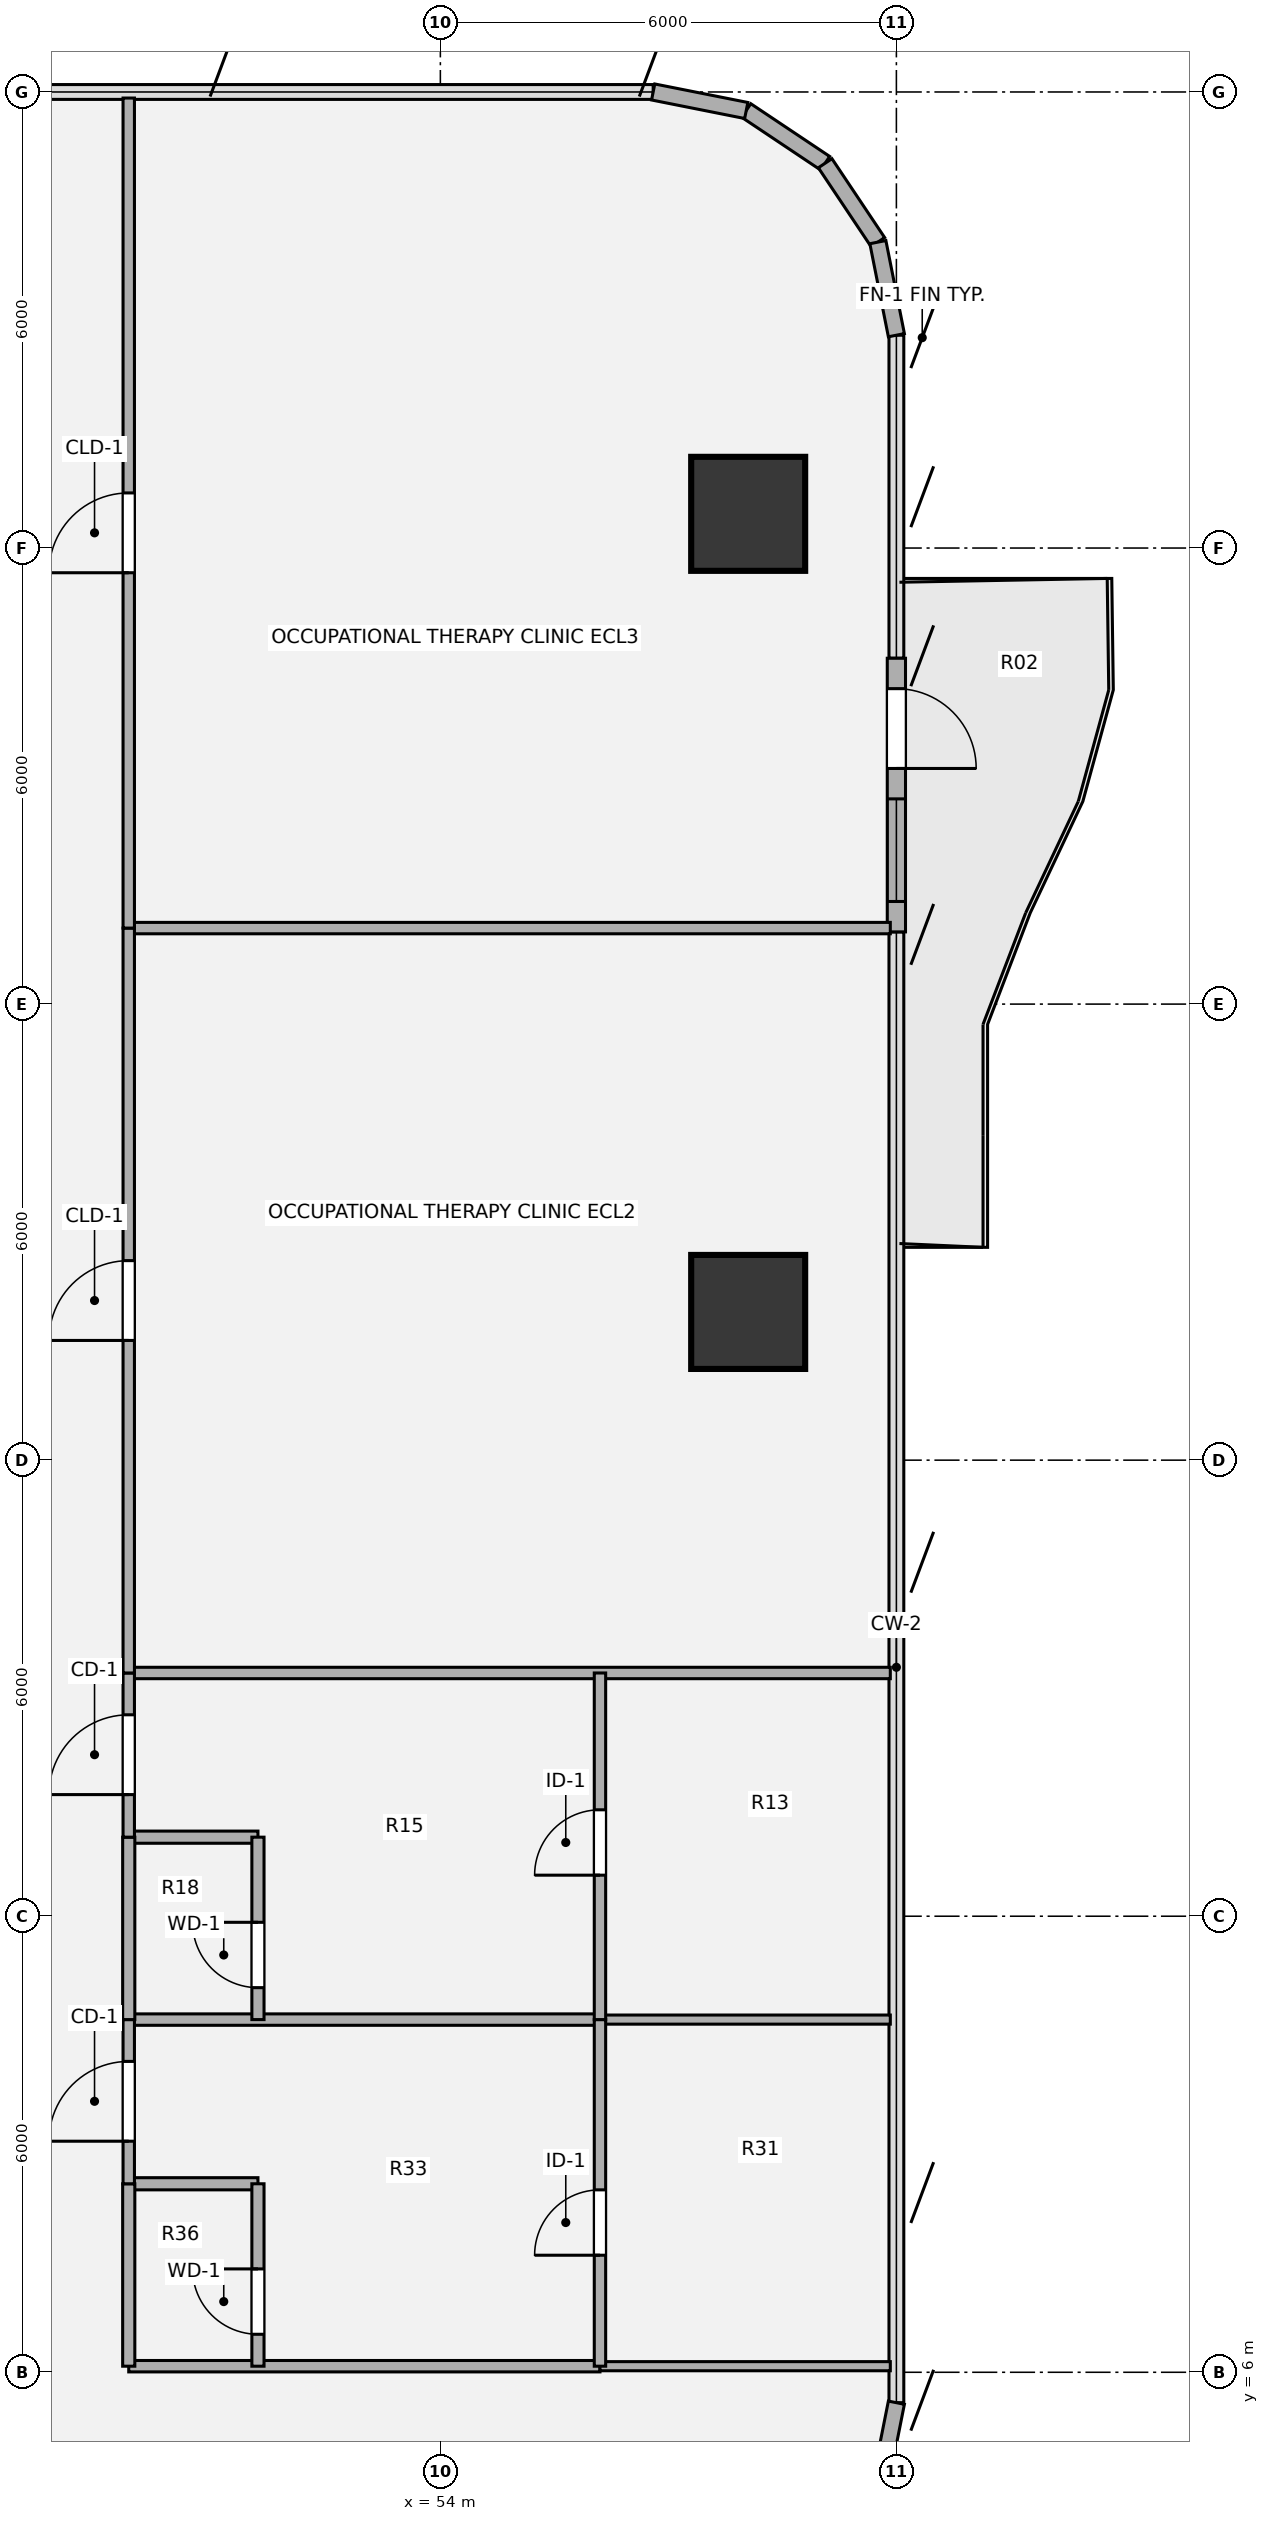
"""IFC4 building model, lengths in metres.
Left out: names, types, materials, properties, quantities, classifications, styles, units other than length and angle.
Written with IfcOpenShell. Run it as: python <this file> out.ifc"""

import sys

from ifc_helpers import new_model, si_unit, direction, frame, frame_2d, origin, origin_2d, place, context, subcontext, project, spatial, rectangle, hollow_circle, extrude, source, transform, mapped, element, fill, save


model = new_model("IFC4")
c1 = context("Model", 3, precision=1e-05, world=origin(), true_north=direction((0.0, 1.0)))
c2 = subcontext(c1, "Body", "Model", "MODEL_VIEW")
j1 = project(units=[si_unit("LENGTHUNIT", "METRE"), si_unit("PLANEANGLEUNIT", "RADIAN")], contexts=[c1])
p1 = place(None, origin())
s1 = spatial("IfcSite", under=j1, at=p1, CompositionType="ELEMENT")
p2 = place(p1, origin())
s2 = spatial("IfcBuilding", under=s1, at=p2, CompositionType="ELEMENT")
p3 = place(p2, frame((0.0, 0.0, 53.46)))
s3 = spatial("IfcBuildingStorey", under=s2, at=p3, CompositionType="ELEMENT", Elevation=53.46)
m1 = source(origin(), c2, "Body", "SweptSolid", [
    extrude(hollow_circle(Radius=0.75, WallThickness=0.05, at=origin_2d()), origin(), (0.0, 0.0, 1.0), 3.78),
])
for number, where, z_axis, x_axis in (
    (1, (58.05, 19.95, 0.0), (0.0, 0.0, 1.0), (1.0, 0.0, 0.0)),
    (2, (58.05, 30.45, 0.0), (0.0, 0.0, 1.0), (1.0, 0.0, 0.0)),
):
    element("IfcColumn", number, at=place(p3, frame(where, z_axis=z_axis, x_axis=x_axis)), inside=s3, PredefinedType="COLUMN", context=c2, shape_type="MappedRepresentation", body=[
        mapped(m1, transform((0.0, 0.0, 0.0), x_axis=(1.0, 0.0, 0.0), y_axis=(0.0, 1.0, 0.0), z_axis=(0.0, 0.0, 1.0), scale=1.0)),
    ])
for number, where, z_axis, x_axis in (
    (3, (58.025, 35.756, 0.0), (0.0, 0.0, 1.0), (0.831, -0.556, 0.0)),
    (4, (59.063, 35.063, 0.0), (0.0, 0.0, 1.0), (0.556, -0.831, 0.0)),
    (5, (59.756, 34.025, 0.0), (0.0, 0.0, 1.0), (0.195, -0.981, 0.0)),
):
    element("IfcWall", number, at=place(p3, frame(where, z_axis=z_axis, x_axis=x_axis)), inside=s3, PredefinedType="SOLIDWALL", context=c2, shape_type="SweptSolid", body=[
        extrude(rectangle(XDim=1.249, YDim=0.215, at=frame_2d((0.624, 0.0))), origin(), (0.0, 0.0, 1.0), 3.53),
    ])
p4 = place(p3, frame((60.0, 28.55, 0.0), z_axis=(0.0, 0.0, 1.0), x_axis=(0.0, -1.0, 0.0)))
e6 = element("IfcWall", 6, at=p4, inside=s3, PredefinedType="SOLIDWALL", context=c2, shape_type="SweptSolid", body=[
    extrude(rectangle(XDim=3.6, YDim=0.24, at=frame_2d((1.8, 0.0))), origin(), (0.0, 0.0, 1.0), 3.53),
])
p5 = place(p4, frame((0.4, 0.0, 0.0)))
e7 = element("IfcOpeningElement", 7, at=p5, cuts=e6, PredefinedType="OPENING", context=c2, shape_type="SweptSolid", body=[
    extrude(rectangle(XDim=1.05, YDim=2.15, at=origin_2d()), frame((0.525, 0.13, 1.075), z_axis=(0.0, -1.0, 0.0), x_axis=(1.0, 0.0, 0.0)), (0.0, 0.0, 1.0), 0.26),
])
p6 = place(p4, frame((1.85, 0.0, 0.85)))
e8 = element("IfcOpeningElement", 8, at=p6, cuts=e6, PredefinedType="OPENING", context=c2, shape_type="SweptSolid", body=[
    extrude(rectangle(XDim=1.35, YDim=1.35, at=origin_2d()), frame((0.675, 0.13, 0.675), z_axis=(0.0, -1.0, 0.0), x_axis=(1.0, 0.0, 0.0)), (0.0, 0.0, 1.0), 0.26),
])
for number, where, z_axis, x_axis in (
    (9, (60.0, 5.6, 0.0), (0.0, 0.0, 1.0), (-0.195, -0.981, 0.0)),
    (10, (56.8, 36.0, 0.0), (0.0, 0.0, 1.0), (0.981, -0.195, 0.0)),
):
    element("IfcWall", number, at=place(p3, frame(where, z_axis=z_axis, x_axis=x_axis)), inside=s3, PredefinedType="SOLIDWALL", context=c2, shape_type="SweptSolid", body=[
        extrude(rectangle(XDim=1.249, YDim=0.215, at=frame_2d((0.624, 0.0))), origin(), (0.0, 0.0, 1.0), 3.53),
    ])
p7 = place(p3, frame((49.9, 6.08, 0.0), z_axis=(0.0, 0.0, 1.0), x_axis=(1.0, 0.0, 0.0)))
e11 = element("IfcWall", 11, at=p7, inside=s3, PredefinedType="PARTITIONING", context=c2, shape_type="SweptSolid", body=[
    extrude(rectangle(XDim=6.2, YDim=0.15, at=frame_2d((3.1, 0.0))), origin(), (0.0, 0.0, 1.0), 3.5),
])
p8 = place(p3, frame((56.1, 6.08, 0.0), z_axis=(0.0, 0.0, 1.0), x_axis=(1.0, 0.0, 0.0)))
e12 = element("IfcWall", 12, at=p8, inside=s3, PredefinedType="PARTITIONING", context=c2, shape_type="SweptSolid", body=[
    extrude(rectangle(XDim=3.82, YDim=0.12, at=frame_2d((1.91, 0.0))), origin(), (0.0, 0.0, 1.0), 3.5),
])
p9 = place(p3, frame((49.9, 8.48, 0.0), z_axis=(0.0, 0.0, 1.0), x_axis=(1.0, 0.0, 0.0)))
e13 = element("IfcWall", 13, at=p9, inside=s3, PredefinedType="PLUMBINGWALL", context=c2, shape_type="SweptSolid", body=[
    extrude(rectangle(XDim=1.7, YDim=0.16, at=frame_2d((0.85, 0.0))), origin(), (0.0, 0.0, 1.0), 3.5),
])
p10 = place(p3, frame((49.9, 10.64, 0.0), z_axis=(0.0, 0.0, 1.0), x_axis=(1.0, 0.0, 0.0)))
e14 = element("IfcWall", 14, at=p10, inside=s3, PredefinedType="PARTITIONING", context=c2, shape_type="SweptSolid", body=[
    extrude(rectangle(XDim=6.2, YDim=0.15, at=frame_2d((3.1, 0.0))), origin(), (0.0, 0.0, 1.0), 3.5),
])
p11 = place(p3, frame((56.1, 10.64, 0.0), z_axis=(0.0, 0.0, 1.0), x_axis=(1.0, 0.0, 0.0)))
e15 = element("IfcWall", 15, at=p11, inside=s3, PredefinedType="PARTITIONING", context=c2, shape_type="SweptSolid", body=[
    extrude(rectangle(XDim=3.82, YDim=0.12, at=frame_2d((1.91, 0.0))), origin(), (0.0, 0.0, 1.0), 3.5),
])
p12 = place(p3, frame((49.9, 13.04, 0.0), z_axis=(0.0, 0.0, 1.0), x_axis=(1.0, 0.0, 0.0)))
e16 = element("IfcWall", 16, at=p12, inside=s3, PredefinedType="PLUMBINGWALL", context=c2, shape_type="SweptSolid", body=[
    extrude(rectangle(XDim=1.7, YDim=0.16, at=frame_2d((0.85, 0.0))), origin(), (0.0, 0.0, 1.0), 3.5),
])
p13 = place(p3, frame((49.9, 15.2, 0.0), z_axis=(0.0, 0.0, 1.0), x_axis=(1.0, 0.0, 0.0)))
e17 = element("IfcWall", 17, at=p13, inside=s3, PredefinedType="PARTITIONING", context=c2, shape_type="SweptSolid", body=[
    extrude(rectangle(XDim=10.02, YDim=0.15, at=frame_2d((5.01, 0.0))), origin(), (0.0, 0.0, 1.0), 3.5),
])
p14 = place(p3, frame((49.9, 25.0, 0.0), z_axis=(0.0, 0.0, 1.0), x_axis=(1.0, 0.0, 0.0)))
e18 = element("IfcWall", 18, at=p14, inside=s3, PredefinedType="PARTITIONING", context=c2, shape_type="SweptSolid", body=[
    extrude(rectangle(XDim=10.02, YDim=0.15, at=frame_2d((5.01, 0.0))), origin(), (0.0, 0.0, 1.0), 2.982),
])
p15 = place(p3, frame((49.9, 6.08, 0.0), z_axis=(0.0, 0.0, 1.0), x_axis=(0.0, 1.0, 0.0)))
e19 = element("IfcWall", 19, at=p15, inside=s3, PredefinedType="PLUMBINGWALL", context=c2, shape_type="SweptSolid", body=[
    extrude(rectangle(XDim=2.4, YDim=0.16, at=frame_2d((1.2, 0.0))), origin(), (0.0, 0.0, 1.0), 3.5),
])
p16 = place(p3, frame((49.9, 8.48, 0.0), z_axis=(0.0, 0.0, 1.0), x_axis=(0.0, 1.0, 0.0)))
e20 = element("IfcWall", 20, at=p16, inside=s3, PredefinedType="PARTITIONING", context=c2, shape_type="SweptSolid", body=[
    extrude(rectangle(XDim=2.16, YDim=0.15, at=frame_2d((1.08, 0.0))), origin(), (0.0, 0.0, 1.0), 3.5),
])
p17 = place(p16, frame((0.56, 0.0, 0.0)))
e21 = element("IfcOpeningElement", 21, at=p17, cuts=e20, PredefinedType="OPENING", context=c2, shape_type="SweptSolid", body=[
    extrude(rectangle(XDim=1.05, YDim=2.1, at=origin_2d()), frame((0.525, 0.085, 1.05), z_axis=(0.0, -1.0, 0.0), x_axis=(1.0, 0.0, 0.0)), (0.0, 0.0, 1.0), 0.17),
])
p18 = place(p3, frame((49.9, 10.64, 0.0), z_axis=(0.0, 0.0, 1.0), x_axis=(0.0, 1.0, 0.0)))
e22 = element("IfcWall", 22, at=p18, inside=s3, PredefinedType="PLUMBINGWALL", context=c2, shape_type="SweptSolid", body=[
    extrude(rectangle(XDim=2.4, YDim=0.16, at=frame_2d((1.2, 0.0))), origin(), (0.0, 0.0, 1.0), 3.5),
])
p19 = place(p3, frame((49.9, 13.04, 0.0), z_axis=(0.0, 0.0, 1.0), x_axis=(0.0, 1.0, 0.0)))
e23 = element("IfcWall", 23, at=p19, inside=s3, PredefinedType="PARTITIONING", context=c2, shape_type="SweptSolid", body=[
    extrude(rectangle(XDim=2.16, YDim=0.15, at=frame_2d((1.08, 0.0))), origin(), (0.0, 0.0, 1.0), 3.5),
])
p20 = place(p19, frame((0.56, 0.0, 0.0)))
e24 = element("IfcOpeningElement", 24, at=p20, cuts=e23, PredefinedType="OPENING", context=c2, shape_type="SweptSolid", body=[
    extrude(rectangle(XDim=1.05, YDim=2.1, at=origin_2d()), frame((0.525, 0.085, 1.05), z_axis=(0.0, -1.0, 0.0), x_axis=(1.0, 0.0, 0.0)), (0.0, 0.0, 1.0), 0.17),
])
p21 = place(p3, frame((49.9, 15.2, 0.0), z_axis=(0.0, 0.0, 1.0), x_axis=(0.0, 1.0, 0.0)))
e25 = element("IfcWall", 25, at=p21, inside=s3, PredefinedType="PARTITIONING", context=c2, shape_type="SweptSolid", body=[
    extrude(rectangle(XDim=9.8, YDim=0.15, at=frame_2d((4.9, 0.0))), origin(), (0.0, 0.0, 1.0), 3.5),
])
p22 = place(p21, frame((4.375, 0.0, 0.0)))
e26 = element("IfcOpeningElement", 26, at=p22, cuts=e25, PredefinedType="OPENING", context=c2, shape_type="SweptSolid", body=[
    extrude(rectangle(XDim=1.05, YDim=2.1, at=origin_2d()), frame((0.525, 0.085, 1.05), z_axis=(0.0, -1.0, 0.0), x_axis=(1.0, 0.0, 0.0)), (0.0, 0.0, 1.0), 0.17),
])
p23 = place(p3, frame((49.9, 25.0, 0.0), z_axis=(0.0, 0.0, 1.0), x_axis=(0.0, 1.0, 0.0)))
e27 = element("IfcWall", 27, at=p23, inside=s3, PredefinedType="PARTITIONING", context=c2, shape_type="SweptSolid", body=[
    extrude(rectangle(XDim=10.92, YDim=0.15, at=frame_2d((5.46, 0.0))), origin(), (0.0, 0.0, 1.0), 3.5),
])
p24 = place(p23, frame((4.675, 0.0, 0.0)))
e28 = element("IfcOpeningElement", 28, at=p24, cuts=e27, PredefinedType="OPENING", context=c2, shape_type="SweptSolid", body=[
    extrude(rectangle(XDim=1.05, YDim=2.1, at=origin_2d()), frame((0.525, 0.085, 1.05), z_axis=(0.0, -1.0, 0.0), x_axis=(1.0, 0.0, 0.0)), (0.0, 0.0, 1.0), 0.17),
])
p25 = place(p3, frame((51.6, 6.08, 0.0), z_axis=(0.0, 0.0, 1.0), x_axis=(0.0, 1.0, 0.0)))
e29 = element("IfcWall", 29, at=p25, inside=s3, PredefinedType="PLUMBINGWALL", context=c2, shape_type="SweptSolid", body=[
    extrude(rectangle(XDim=2.4, YDim=0.16, at=frame_2d((1.2, 0.0))), origin(), (0.0, 0.0, 1.0), 3.5),
])
p26 = place(p25, frame((0.42, 0.0, 0.0)))
e30 = element("IfcOpeningElement", 30, at=p26, cuts=e29, PredefinedType="OPENING", context=c2, shape_type="SweptSolid", body=[
    extrude(rectangle(XDim=0.86, YDim=2.1, at=origin_2d()), frame((0.43, 0.09, 1.05), z_axis=(0.0, -1.0, 0.0), x_axis=(1.0, 0.0, 0.0)), (0.0, 0.0, 1.0), 0.18),
])
p27 = place(p3, frame((51.6, 10.64, 0.0), z_axis=(0.0, 0.0, 1.0), x_axis=(0.0, 1.0, 0.0)))
e31 = element("IfcWall", 31, at=p27, inside=s3, PredefinedType="PLUMBINGWALL", context=c2, shape_type="SweptSolid", body=[
    extrude(rectangle(XDim=2.4, YDim=0.16, at=frame_2d((1.2, 0.0))), origin(), (0.0, 0.0, 1.0), 3.5),
])
p28 = place(p27, frame((0.42, 0.0, 0.0)))
e32 = element("IfcOpeningElement", 32, at=p28, cuts=e31, PredefinedType="OPENING", context=c2, shape_type="SweptSolid", body=[
    extrude(rectangle(XDim=0.86, YDim=2.1, at=origin_2d()), frame((0.43, 0.09, 1.05), z_axis=(0.0, -1.0, 0.0), x_axis=(1.0, 0.0, 0.0)), (0.0, 0.0, 1.0), 0.18),
])
p29 = place(p3, frame((56.1, 6.08, 0.0), z_axis=(0.0, 0.0, 1.0), x_axis=(0.0, 1.0, 0.0)))
e33 = element("IfcWall", 33, at=p29, inside=s3, PredefinedType="PARTITIONING", context=c2, shape_type="SweptSolid", body=[
    extrude(rectangle(XDim=4.56, YDim=0.15, at=frame_2d((2.28, 0.0))), origin(), (0.0, 0.0, 1.0), 3.5),
])
p30 = place(p29, frame((1.46, 0.0, 0.0)))
e34 = element("IfcOpeningElement", 34, at=p30, cuts=e33, PredefinedType="OPENING", context=c2, shape_type="SweptSolid", body=[
    extrude(rectangle(XDim=0.86, YDim=2.1, at=origin_2d()), frame((0.43, 0.085, 1.05), z_axis=(0.0, -1.0, 0.0), x_axis=(1.0, 0.0, 0.0)), (0.0, 0.0, 1.0), 0.17),
])
p31 = place(p3, frame((56.1, 10.64, 0.0), z_axis=(0.0, 0.0, 1.0), x_axis=(0.0, 1.0, 0.0)))
e35 = element("IfcWall", 35, at=p31, inside=s3, PredefinedType="PARTITIONING", context=c2, shape_type="SweptSolid", body=[
    extrude(rectangle(XDim=4.56, YDim=0.15, at=frame_2d((2.28, 0.0))), origin(), (0.0, 0.0, 1.0), 3.5),
])
p32 = place(p31, frame((1.9, 0.0, 0.0)))
e36 = element("IfcOpeningElement", 36, at=p32, cuts=e35, PredefinedType="OPENING", context=c2, shape_type="SweptSolid", body=[
    extrude(rectangle(XDim=0.86, YDim=2.1, at=origin_2d()), frame((0.43, 0.085, 1.05), z_axis=(0.0, -1.0, 0.0), x_axis=(1.0, 0.0, 0.0)), (0.0, 0.0, 1.0), 0.17),
])
m2 = source(origin(), c2, "Body", "SweptSolid", [
    extrude(rectangle(XDim=1.05, YDim=2.15, at=origin_2d()), frame((0.525, 0.025, 1.075), z_axis=(0.0, -1.0, 0.0), x_axis=(1.0, 0.0, 0.0)), (0.0, 0.0, 1.0), 0.05),
])
p33 = place(p5, origin())
e37 = element("IfcDoor", 37, at=p33, inside=s3, OperationType="SINGLE_SWING_RIGHT", PredefinedType="DOOR", context=c2, shape_type="MappedRepresentation", body=[
    mapped(m2, transform((0.0, 0.0, 0.0), x_axis=(1.0, 0.0, 0.0), y_axis=(0.0, 1.0, 0.0), z_axis=(0.0, 0.0, 1.0), scale=1.0)),
])
fill(e7, e37)
m3 = source(origin(), c2, "Body", "SweptSolid", [
    extrude(rectangle(XDim=1.35, YDim=1.35, at=origin_2d()), frame((0.675, 0.03, 0.675), z_axis=(0.0, -1.0, 0.0), x_axis=(1.0, 0.0, 0.0)), (0.0, 0.0, 1.0), 0.06),
])
p34 = place(p6, origin())
e38 = element("IfcWindow", 38, at=p34, inside=s3, PartitioningType="SINGLE_PANEL", PredefinedType="WINDOW", context=c2, shape_type="MappedRepresentation", body=[
    mapped(m3, transform((0.0, 0.0, 0.0), x_axis=(1.0, 0.0, 0.0), y_axis=(0.0, 1.0, 0.0), z_axis=(0.0, 0.0, 1.0), scale=1.0)),
])
fill(e8, e38)
m4 = source(origin(), c2, "Body", "SweptSolid", [
    extrude(rectangle(XDim=1.05, YDim=2.1, at=origin_2d()), frame((0.525, 0.025, 1.05), z_axis=(0.0, -1.0, 0.0), x_axis=(1.0, 0.0, 0.0)), (0.0, 0.0, 1.0), 0.05),
])
p35 = place(p17, origin())
e39 = element("IfcDoor", 39, at=p35, inside=s3, OperationType="SINGLE_SWING_LEFT", PredefinedType="DOOR", context=c2, shape_type="MappedRepresentation", body=[
    mapped(m4, transform((0.0, 0.0, 0.0), x_axis=(1.0, 0.0, 0.0), y_axis=(0.0, 1.0, 0.0), z_axis=(0.0, 0.0, 1.0), scale=1.0)),
])
fill(e21, e39)
p36 = place(p20, origin())
e40 = element("IfcDoor", 40, at=p36, inside=s3, OperationType="SINGLE_SWING_LEFT", PredefinedType="DOOR", context=c2, shape_type="MappedRepresentation", body=[
    mapped(m4, transform((0.0, 0.0, 0.0), x_axis=(1.0, 0.0, 0.0), y_axis=(0.0, 1.0, 0.0), z_axis=(0.0, 0.0, 1.0), scale=1.0)),
])
fill(e24, e40)
m5 = source(origin(), c2, "Body", "SweptSolid", [
    extrude(rectangle(XDim=1.05, YDim=2.1, at=origin_2d()), frame((0.525, 0.025, 1.05), z_axis=(0.0, -1.0, 0.0), x_axis=(1.0, 0.0, 0.0)), (0.0, 0.0, 1.0), 0.05),
])
p37 = place(p22, origin())
e41 = element("IfcDoor", 41, at=p37, inside=s3, OperationType="SINGLE_SWING_LEFT", PredefinedType="DOOR", context=c2, shape_type="MappedRepresentation", body=[
    mapped(m5, transform((0.0, 0.0, 0.0), x_axis=(1.0, 0.0, 0.0), y_axis=(0.0, 1.0, 0.0), z_axis=(0.0, 0.0, 1.0), scale=1.0)),
])
fill(e26, e41)
p38 = place(p24, origin())
e42 = element("IfcDoor", 42, at=p38, inside=s3, OperationType="SINGLE_SWING_LEFT", PredefinedType="DOOR", context=c2, shape_type="MappedRepresentation", body=[
    mapped(m5, transform((0.0, 0.0, 0.0), x_axis=(1.0, 0.0, 0.0), y_axis=(0.0, 1.0, 0.0), z_axis=(0.0, 0.0, 1.0), scale=1.0)),
])
fill(e28, e42)
m6 = source(origin(), c2, "Body", "SweptSolid", [
    extrude(rectangle(XDim=0.86, YDim=2.1, at=origin_2d()), frame((0.43, 0.025, 1.05), z_axis=(0.0, -1.0, 0.0), x_axis=(1.0, 0.0, 0.0)), (0.0, 0.0, 1.0), 0.05),
])
p39 = place(p26, origin())
e43 = element("IfcDoor", 43, at=p39, inside=s3, OperationType="SINGLE_SWING_RIGHT", PredefinedType="DOOR", context=c2, shape_type="MappedRepresentation", body=[
    mapped(m6, transform((0.0, 0.0, 0.0), x_axis=(1.0, 0.0, 0.0), y_axis=(0.0, 1.0, 0.0), z_axis=(0.0, 0.0, 1.0), scale=1.0)),
])
fill(e30, e43)
p40 = place(p28, origin())
e44 = element("IfcDoor", 44, at=p40, inside=s3, OperationType="SINGLE_SWING_RIGHT", PredefinedType="DOOR", context=c2, shape_type="MappedRepresentation", body=[
    mapped(m6, transform((0.0, 0.0, 0.0), x_axis=(1.0, 0.0, 0.0), y_axis=(0.0, 1.0, 0.0), z_axis=(0.0, 0.0, 1.0), scale=1.0)),
])
fill(e32, e44)
m7 = source(origin(), c2, "Body", "SweptSolid", [
    extrude(rectangle(XDim=0.86, YDim=2.1, at=origin_2d()), frame((0.43, 0.025, 1.05), z_axis=(0.0, -1.0, 0.0), x_axis=(1.0, 0.0, 0.0)), (0.0, 0.0, 1.0), 0.05),
])
p41 = place(p30, origin())
e45 = element("IfcDoor", 45, at=p41, inside=s3, OperationType="SINGLE_SWING_LEFT", PredefinedType="DOOR", context=c2, shape_type="MappedRepresentation", body=[
    mapped(m7, transform((0.0, 0.0, 0.0), x_axis=(1.0, 0.0, 0.0), y_axis=(0.0, 1.0, 0.0), z_axis=(0.0, 0.0, 1.0), scale=1.0)),
])
fill(e34, e45)
p42 = place(p32, origin())
e46 = element("IfcDoor", 46, at=p42, inside=s3, OperationType="SINGLE_SWING_LEFT", PredefinedType="DOOR", context=c2, shape_type="MappedRepresentation", body=[
    mapped(m7, transform((0.0, 0.0, 0.0), x_axis=(1.0, 0.0, 0.0), y_axis=(0.0, 1.0, 0.0), z_axis=(0.0, 0.0, 1.0), scale=1.0)),
])
fill(e36, e46)
save(model, sys.argv[1])
